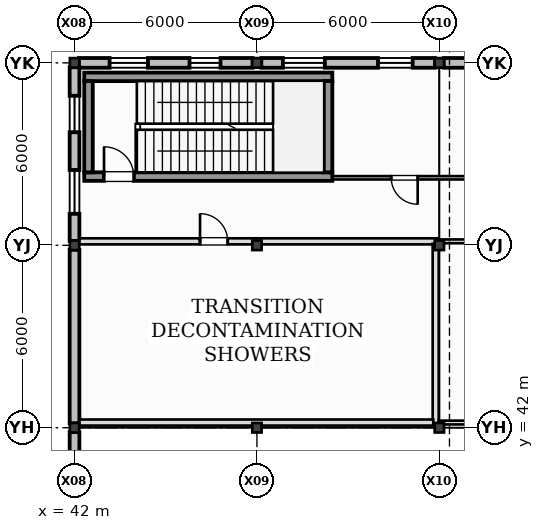
"""IFC4 building model, lengths in metres.
Left out: names, types, materials, properties, quantities, classifications, styles, units other than length and angle.
Written with IfcOpenShell. Run it as: python <this file> out.ifc"""

import sys

from ifc_helpers import new_model, si_unit, direction, frame, frame_2d, origin, origin_2d, place, context, subcontext, project, spatial, rectangle, i_section, extrude, element, fill, save


model = new_model("IFC4")
c1 = context("Model", 3, precision=1e-05, world=origin(), true_north=direction((0.0, 1.0)))
c2 = subcontext(c1, "Body", "Model", "MODEL_VIEW")
j1 = project(units=[si_unit("LENGTHUNIT", "METRE"), si_unit("PLANEANGLEUNIT", "RADIAN")], contexts=[c1])
p1 = place(None, origin())
s1 = spatial("IfcSite", under=j1, at=p1, CompositionType="ELEMENT")
p2 = place(p1, origin())
s2 = spatial("IfcBuilding", under=s1, at=p2, CompositionType="ELEMENT")
p3 = place(p2, frame((0.0, 0.0, 6.0)))
s3 = spatial("IfcBuildingStorey", under=s2, at=p3, CompositionType="ELEMENT", Elevation=6.0)
for number, where, z_axis, x_axis in (
    (1, (42.0, 42.0, 0.0), (0.0, 0.0, 1.0), (1.0, 0.0, 0.0)),
    (2, (42.0, 48.0, 0.0), (0.0, 0.0, 1.0), (1.0, 0.0, 0.0)),
    (3, (42.0, 54.0, 0.0), (0.0, 0.0, 1.0), (1.0, 0.0, 0.0)),
    (4, (48.0, 42.0, 0.0), (0.0, 0.0, 1.0), (1.0, 0.0, 0.0)),
    (5, (48.0, 48.0, 0.0), (0.0, 0.0, 1.0), (1.0, 0.0, 0.0)),
    (6, (48.0, 54.0, 0.0), (0.0, 0.0, 1.0), (1.0, 0.0, 0.0)),
    (7, (54.0, 42.0, 0.0), (0.0, 0.0, 1.0), (1.0, 0.0, 0.0)),
    (8, (54.0, 48.0, 0.0), (0.0, 0.0, 1.0), (1.0, 0.0, 0.0)),
    (9, (54.0, 54.0, 0.0), (0.0, 0.0, 1.0), (1.0, 0.0, 0.0)),
):
    element("IfcColumn", number, at=place(p3, frame(where, z_axis=z_axis, x_axis=x_axis)), inside=s3, PredefinedType="COLUMN", context=c2, shape_type="SweptSolid", body=[
        extrude(i_section(OverallWidth=0.307, OverallDepth=0.314, WebThickness=0.011, FlangeThickness=0.019, at=origin_2d()), origin(), (0.0, 0.0, 1.0), 4.0),
    ])
p4 = place(p3, frame((47.855, 54.0, 0.0), z_axis=(0.0, 0.0, 1.0), x_axis=(-1.0, 0.0, 0.0)))
e10 = element("IfcWall", 10, at=p4, inside=s3, PredefinedType="STANDARD", context=c2, shape_type="SweptSolid", body=[
    extrude(rectangle(XDim=5.71, YDim=0.32, at=frame_2d((2.855, 0.0))), origin(), (0.0, 0.0, 1.0), 4.0),
])
p5 = place(p4, frame((1.053, 0.0, 0.96)))
e11 = element("IfcOpeningElement", 11, at=p5, cuts=e10, PredefinedType="OPENING", context=c2, shape_type="SweptSolid", body=[
    extrude(rectangle(XDim=1.02, YDim=1.02, at=frame_2d((0.51, 0.51))), frame((0.0, 0.17, 0.0), z_axis=(0.0, -1.0, 0.0), x_axis=(1.0, 0.0, 0.0)), (0.0, 0.0, 1.0), 0.34),
])
p6 = place(p4, frame((3.441, 0.0, 0.86)))
e12 = element("IfcOpeningElement", 12, at=p6, cuts=e10, PredefinedType="OPENING", context=c2, shape_type="SweptSolid", body=[
    extrude(rectangle(XDim=1.26, YDim=1.26, at=frame_2d((0.63, 0.63))), frame((0.0, 0.17, 0.0), z_axis=(0.0, -1.0, 0.0), x_axis=(1.0, 0.0, 0.0)), (0.0, 0.0, 1.0), 0.34),
])
p7 = place(p3, frame((53.855, 54.0, 0.0), z_axis=(0.0, 0.0, 1.0), x_axis=(-1.0, 0.0, 0.0)))
e13 = element("IfcWall", 13, at=p7, inside=s3, PredefinedType="STANDARD", context=c2, shape_type="SweptSolid", body=[
    extrude(rectangle(XDim=5.71, YDim=0.32, at=frame_2d((2.855, 0.0))), origin(), (0.0, 0.0, 1.0), 4.0),
])
p8 = place(p7, frame((0.733, 0.0, 1.28)))
e14 = element("IfcOpeningElement", 14, at=p8, cuts=e13, PredefinedType="OPENING", context=c2, shape_type="SweptSolid", body=[
    extrude(rectangle(XDim=1.14, YDim=1.14, at=frame_2d((0.57, 0.57))), frame((0.0, 0.17, 0.0), z_axis=(0.0, -1.0, 0.0), x_axis=(1.0, 0.0, 0.0)), (0.0, 0.0, 1.0), 0.34),
])
p9 = place(p7, frame((3.621, 0.0, 1.18)))
e15 = element("IfcOpeningElement", 15, at=p9, cuts=e13, PredefinedType="OPENING", context=c2, shape_type="SweptSolid", body=[
    extrude(rectangle(XDim=1.38, YDim=1.38, at=frame_2d((0.69, 0.69))), frame((0.0, 0.17, 0.0), z_axis=(0.0, -1.0, 0.0), x_axis=(1.0, 0.0, 0.0)), (0.0, 0.0, 1.0), 0.34),
])
p10 = place(p3, frame((59.855, 54.0, 0.0), z_axis=(0.0, 0.0, 1.0), x_axis=(-1.0, 0.0, 0.0)))
e16 = element("IfcWall", 16, at=p10, inside=s3, PredefinedType="STANDARD", context=c2, shape_type="SweptSolid", body=[
    extrude(rectangle(XDim=5.71, YDim=0.32, at=frame_2d((2.855, 0.0))), origin(), (0.0, 0.0, 1.0), 4.0),
])
p11 = place(p10, frame((0.897, 0.0, 0.86)))
e17 = element("IfcOpeningElement", 17, at=p11, cuts=e16, PredefinedType="OPENING", context=c2, shape_type="SweptSolid", body=[
    extrude(rectangle(XDim=1.26, YDim=1.26, at=frame_2d((0.63, 0.63))), frame((0.0, 0.17, 0.0), z_axis=(0.0, -1.0, 0.0), x_axis=(1.0, 0.0, 0.0)), (0.0, 0.0, 1.0), 0.34),
])
p12 = place(p3, frame((42.0, 41.855, 0.0), z_axis=(0.0, 0.0, 1.0), x_axis=(0.0, -1.0, 0.0)))
e18 = element("IfcWall", 18, at=p12, inside=s3, PredefinedType="STANDARD", context=c2, shape_type="SweptSolid", body=[
    extrude(rectangle(XDim=5.71, YDim=0.32, at=frame_2d((2.855, 0.0))), origin(), (0.0, 0.0, 1.0), 3.318),
])
p13 = place(p12, frame((1.014, 0.0, 0.96)))
e19 = element("IfcOpeningElement", 19, at=p13, cuts=e18, PredefinedType="OPENING", context=c2, shape_type="SweptSolid", body=[
    extrude(rectangle(XDim=1.08, YDim=1.08, at=frame_2d((0.54, 0.54))), frame((0.0, 0.17, 0.0), z_axis=(0.0, -1.0, 0.0), x_axis=(1.0, 0.0, 0.0)), (0.0, 0.0, 1.0), 0.34),
])
p14 = place(p12, frame((3.42, 0.0, 0.86)))
e20 = element("IfcOpeningElement", 20, at=p14, cuts=e18, PredefinedType="OPENING", context=c2, shape_type="SweptSolid", body=[
    extrude(rectangle(XDim=1.32, YDim=1.32, at=frame_2d((0.66, 0.66))), frame((0.0, 0.17, 0.0), z_axis=(0.0, -1.0, 0.0), x_axis=(1.0, 0.0, 0.0)), (0.0, 0.0, 1.0), 0.34),
])
p15 = place(p3, frame((42.0, 47.855, 0.0), z_axis=(0.0, 0.0, 1.0), x_axis=(0.0, -1.0, 0.0)))
e21 = element("IfcWall", 21, at=p15, inside=s3, PredefinedType="STANDARD", context=c2, shape_type="SweptSolid", body=[
    extrude(rectangle(XDim=5.71, YDim=0.32, at=frame_2d((2.855, 0.0))), origin(), (0.0, 0.0, 1.0), 3.339),
])
p16 = place(p3, frame((42.0, 53.855, 0.0), z_axis=(0.0, 0.0, 1.0), x_axis=(0.0, -1.0, 0.0)))
e22 = element("IfcWall", 22, at=p16, inside=s3, PredefinedType="STANDARD", context=c2, shape_type="SweptSolid", body=[
    extrude(rectangle(XDim=5.71, YDim=0.32, at=frame_2d((2.855, 0.0))), origin(), (0.0, 0.0, 1.0), 3.339),
])
p17 = place(p16, frame((0.936, 0.0, 0.86)))
e23 = element("IfcOpeningElement", 23, at=p17, cuts=e22, PredefinedType="OPENING", context=c2, shape_type="SweptSolid", body=[
    extrude(rectangle(XDim=1.2, YDim=1.2, at=frame_2d((0.6, 0.6))), frame((0.0, 0.17, 0.0), z_axis=(0.0, -1.0, 0.0), x_axis=(1.0, 0.0, 0.0)), (0.0, 0.0, 1.0), 0.34),
])
p18 = place(p16, frame((3.378, 0.0, 1.42)))
e24 = element("IfcOpeningElement", 24, at=p18, cuts=e22, PredefinedType="OPENING", context=c2, shape_type="SweptSolid", body=[
    extrude(rectangle(XDim=1.44, YDim=1.44, at=frame_2d((0.72, 0.72))), frame((0.0, 0.17, 0.0), z_axis=(0.0, -1.0, 0.0), x_axis=(1.0, 0.0, 0.0)), (0.0, 0.0, 1.0), 0.34),
])
p19 = place(p3, frame((42.32, 50.26, 0.0), z_axis=(0.0, 0.0, 1.0), x_axis=(1.0, 0.0, 0.0)))
e25 = element("IfcWall", 25, at=p19, inside=s3, PredefinedType="SHEAR", context=c2, shape_type="SweptSolid", body=[
    extrude(rectangle(XDim=8.16, YDim=0.28, at=frame_2d((4.08, 0.0))), origin(), (0.0, 0.0, 1.0), 3.75),
])
p20 = place(p19, frame((0.65, 0.0, 0.0)))
e26 = element("IfcOpeningElement", 26, at=p20, cuts=e25, PredefinedType="OPENING", context=c2, shape_type="SweptSolid", body=[
    extrude(rectangle(XDim=0.98, YDim=2.15, at=frame_2d((0.49, 1.075))), frame((0.0, 0.15, 0.0), z_axis=(0.0, -1.0, 0.0), x_axis=(1.0, 0.0, 0.0)), (0.0, 0.0, 1.0), 0.3),
])
p21 = place(p3, frame((50.48, 53.54, 0.0), z_axis=(0.0, 0.0, 1.0), x_axis=(-1.0, 0.0, 0.0)))
e27 = element("IfcWall", 27, at=p21, inside=s3, PredefinedType="SHEAR", context=c2, shape_type="SweptSolid", body=[
    extrude(rectangle(XDim=8.16, YDim=0.28, at=frame_2d((4.08, 0.0))), origin(), (0.0, 0.0, 1.0), 3.75),
])
for number, where, z_axis, x_axis in (
    (28, (42.46, 53.4, 0.0), (0.0, 0.0, 1.0), (0.0, -1.0, 0.0)),
    (29, (50.34, 50.4, 0.0), (0.0, 0.0, 1.0), (0.0, 1.0, 0.0)),
):
    element("IfcWall", number, at=place(p3, frame(where, z_axis=z_axis, x_axis=x_axis)), inside=s3, PredefinedType="SHEAR", context=c2, shape_type="SweptSolid", body=[
        extrude(rectangle(XDim=3.0, YDim=0.28, at=frame_2d((1.5, 0.0))), origin(), (0.0, 0.0, 1.0), 3.75),
    ])
p22 = place(p3, frame((42.16, 48.13, 0.0), z_axis=(0.0, 0.0, 1.0), x_axis=(1.0, 0.0, 0.0)))
e30 = element("IfcWall", 30, at=p22, inside=s3, PredefinedType="PARTITIONING", context=c2, shape_type="SweptSolid", body=[
    extrude(rectangle(XDim=11.76, YDim=0.2, at=frame_2d((5.88, 0.0))), origin(), (0.0, 0.0, 1.0), 3.72),
])
p23 = place(p22, frame((3.969, 0.0, 0.0)))
e31 = element("IfcOpeningElement", 31, at=p23, cuts=e30, PredefinedType="OPENING", context=c2, shape_type="SweptSolid", body=[
    extrude(rectangle(XDim=0.91, YDim=2.1, at=frame_2d((0.455, 1.05))), frame((0.0, 0.11, 0.0), z_axis=(0.0, -1.0, 0.0), x_axis=(1.0, 0.0, 0.0)), (0.0, 0.0, 1.0), 0.22),
])
p24 = place(p3, frame((53.88, 48.05, 0.0), z_axis=(0.0, 0.0, 1.0), x_axis=(0.0, -1.0, 0.0)))
e32 = element("IfcWall", 32, at=p24, inside=s3, PredefinedType="PARTITIONING", context=c2, shape_type="SweptSolid", body=[
    extrude(rectangle(XDim=5.92, YDim=0.2, at=frame_2d((2.96, 0.0))), origin(), (0.0, 0.0, 1.0), 3.72),
])
p25 = place(p3, frame((53.8, 42.17, 0.0), z_axis=(0.0, 0.0, 1.0), x_axis=(-1.0, 0.0, 0.0)))
e33 = element("IfcWall", 33, at=p25, inside=s3, PredefinedType="PARTITIONING", context=c2, shape_type="SweptSolid", body=[
    extrude(rectangle(XDim=11.64, YDim=0.2, at=frame_2d((5.82, 0.0))), origin(), (0.0, 0.0, 1.0), 3.72),
])
p26 = place(p3, frame((53.98, 48.13, 0.0), z_axis=(0.0, 0.0, 1.0), x_axis=(1.0, 0.0, 0.0)))
e34 = element("IfcWall", 34, at=p26, inside=s3, PredefinedType="PARTITIONING", context=c2, shape_type="SweptSolid", body=[
    extrude(rectangle(XDim=11.92, YDim=0.125, at=frame_2d((5.96, 0.0))), origin(), (0.0, 0.0, 1.0), 3.72),
])
p27 = place(p26, frame((3.936, 0.0, 0.0)))
e35 = element("IfcOpeningElement", 35, at=p27, cuts=e34, PredefinedType="OPENING", context=c2, shape_type="SweptSolid", body=[
    extrude(rectangle(XDim=1.16, YDim=2.2, at=frame_2d((0.58, 1.1))), frame((0.0, 0.073, 0.0), z_axis=(0.0, -1.0, 0.0), x_axis=(1.0, 0.0, 0.0)), (0.0, 0.0, 1.0), 0.145),
])
p28 = place(p3, frame((65.9, 42.17, 0.0), z_axis=(0.0, 0.0, 1.0), x_axis=(-1.0, 0.0, 0.0)))
e36 = element("IfcWall", 36, at=p28, inside=s3, PredefinedType="PARTITIONING", context=c2, shape_type="SweptSolid", body=[
    extrude(rectangle(XDim=11.92, YDim=0.125, at=frame_2d((5.96, 0.0))), origin(), (0.0, 0.0, 1.0), 3.72),
])
p29 = place(p3, frame((55.225, 50.22, 0.0), z_axis=(0.0, 0.0, 1.0), x_axis=(-1.0, 0.0, 0.0)))
e37 = element("IfcWall", 37, at=p29, inside=s3, PredefinedType="PARTITIONING", context=c2, shape_type="SweptSolid", body=[
    extrude(rectangle(XDim=4.745, YDim=0.11, at=frame_2d((2.373, 0.0))), origin(), (0.0, 0.0, 1.0), 3.72),
])
p30 = place(p29, frame((1.938, 0.0, 0.0)))
e38 = element("IfcOpeningElement", 38, at=p30, cuts=e37, PredefinedType="OPENING", context=c2, shape_type="SweptSolid", body=[
    extrude(rectangle(XDim=0.87, YDim=2.06, at=frame_2d((0.435, 1.03))), frame((0.0, 0.065, 0.0), z_axis=(0.0, -1.0, 0.0), x_axis=(1.0, 0.0, 0.0)), (0.0, 0.0, 1.0), 0.13),
])
p31 = place(p5, origin())
e39 = element("IfcWindow", 39, at=p31, inside=s3, PartitioningType="SINGLE_PANEL", PredefinedType="WINDOW", context=c2, shape_type="SweptSolid", body=[
    extrude(rectangle(XDim=1.02, YDim=1.02, at=frame_2d((0.51, 0.51))), frame((0.0, 0.03, 0.0), z_axis=(0.0, -1.0, 0.0), x_axis=(1.0, 0.0, 0.0)), (0.0, 0.0, 1.0), 0.06),
])
fill(e11, e39)
p32 = place(p6, origin())
e40 = element("IfcWindow", 40, at=p32, inside=s3, PartitioningType="SINGLE_PANEL", PredefinedType="WINDOW", context=c2, shape_type="SweptSolid", body=[
    extrude(rectangle(XDim=1.26, YDim=1.26, at=frame_2d((0.63, 0.63))), frame((0.0, 0.03, 0.0), z_axis=(0.0, -1.0, 0.0), x_axis=(1.0, 0.0, 0.0)), (0.0, 0.0, 1.0), 0.06),
])
fill(e12, e40)
p33 = place(p8, origin())
e41 = element("IfcWindow", 41, at=p33, inside=s3, PartitioningType="SINGLE_PANEL", PredefinedType="WINDOW", context=c2, shape_type="SweptSolid", body=[
    extrude(rectangle(XDim=1.14, YDim=1.14, at=frame_2d((0.57, 0.57))), frame((0.0, 0.03, 0.0), z_axis=(0.0, -1.0, 0.0), x_axis=(1.0, 0.0, 0.0)), (0.0, 0.0, 1.0), 0.06),
])
fill(e14, e41)
p34 = place(p9, origin())
e42 = element("IfcWindow", 42, at=p34, inside=s3, PartitioningType="SINGLE_PANEL", PredefinedType="WINDOW", context=c2, shape_type="SweptSolid", body=[
    extrude(rectangle(XDim=1.38, YDim=1.38, at=frame_2d((0.69, 0.69))), frame((0.0, 0.03, 0.0), z_axis=(0.0, -1.0, 0.0), x_axis=(1.0, 0.0, 0.0)), (0.0, 0.0, 1.0), 0.06),
])
fill(e15, e42)
p35 = place(p17, origin())
e43 = element("IfcWindow", 43, at=p35, inside=s3, PartitioningType="SINGLE_PANEL", PredefinedType="WINDOW", context=c2, shape_type="SweptSolid", body=[
    extrude(rectangle(XDim=1.2, YDim=1.2, at=frame_2d((0.6, 0.6))), frame((0.0, 0.03, 0.0), z_axis=(0.0, -1.0, 0.0), x_axis=(1.0, 0.0, 0.0)), (0.0, 0.0, 1.0), 0.06),
])
fill(e23, e43)
p36 = place(p18, origin())
e44 = element("IfcWindow", 44, at=p36, inside=s3, PartitioningType="SINGLE_PANEL", PredefinedType="WINDOW", context=c2, shape_type="SweptSolid", body=[
    extrude(rectangle(XDim=1.44, YDim=1.44, at=frame_2d((0.72, 0.72))), frame((0.0, 0.03, 0.0), z_axis=(0.0, -1.0, 0.0), x_axis=(1.0, 0.0, 0.0)), (0.0, 0.0, 1.0), 0.06),
])
fill(e24, e44)
p37 = place(p20, origin())
e45 = element("IfcDoor", 45, at=p37, inside=s3, OperationType="SINGLE_SWING_LEFT", PredefinedType="DOOR", context=c2, shape_type="SweptSolid", body=[
    extrude(rectangle(XDim=0.98, YDim=2.15, at=frame_2d((0.49, 1.075))), frame((0.0, 0.025, 0.0), z_axis=(0.0, -1.0, 0.0), x_axis=(1.0, 0.0, 0.0)), (0.0, 0.0, 1.0), 0.05),
])
fill(e26, e45)
p38 = place(p23, frame((0.91, 0.0, 0.0), z_axis=(0.0, 0.0, 1.0), x_axis=(-1.0, 0.0, 0.0)))
e46 = element("IfcDoor", 46, at=p38, inside=s3, OperationType="SINGLE_SWING_LEFT", PredefinedType="DOOR", context=c2, shape_type="SweptSolid", body=[
    extrude(rectangle(XDim=0.91, YDim=2.1, at=frame_2d((0.455, 1.05))), frame((0.0, 0.025, 0.0), z_axis=(0.0, -1.0, 0.0), x_axis=(1.0, 0.0, 0.0)), (0.0, 0.0, 1.0), 0.05),
])
fill(e31, e46)
p39 = place(p30, frame((0.87, 0.0, 0.0), z_axis=(0.0, 0.0, 1.0), x_axis=(-1.0, 0.0, 0.0)))
e47 = element("IfcDoor", 47, at=p39, inside=s3, OperationType="SINGLE_SWING_LEFT", PredefinedType="DOOR", context=c2, shape_type="SweptSolid", body=[
    extrude(rectangle(XDim=0.87, YDim=2.06, at=frame_2d((0.435, 1.03))), frame((0.0, 0.025, 0.0), z_axis=(0.0, -1.0, 0.0), x_axis=(1.0, 0.0, 0.0)), (0.0, 0.0, 1.0), 0.05),
])
fill(e38, e47)
save(model, sys.argv[1])
